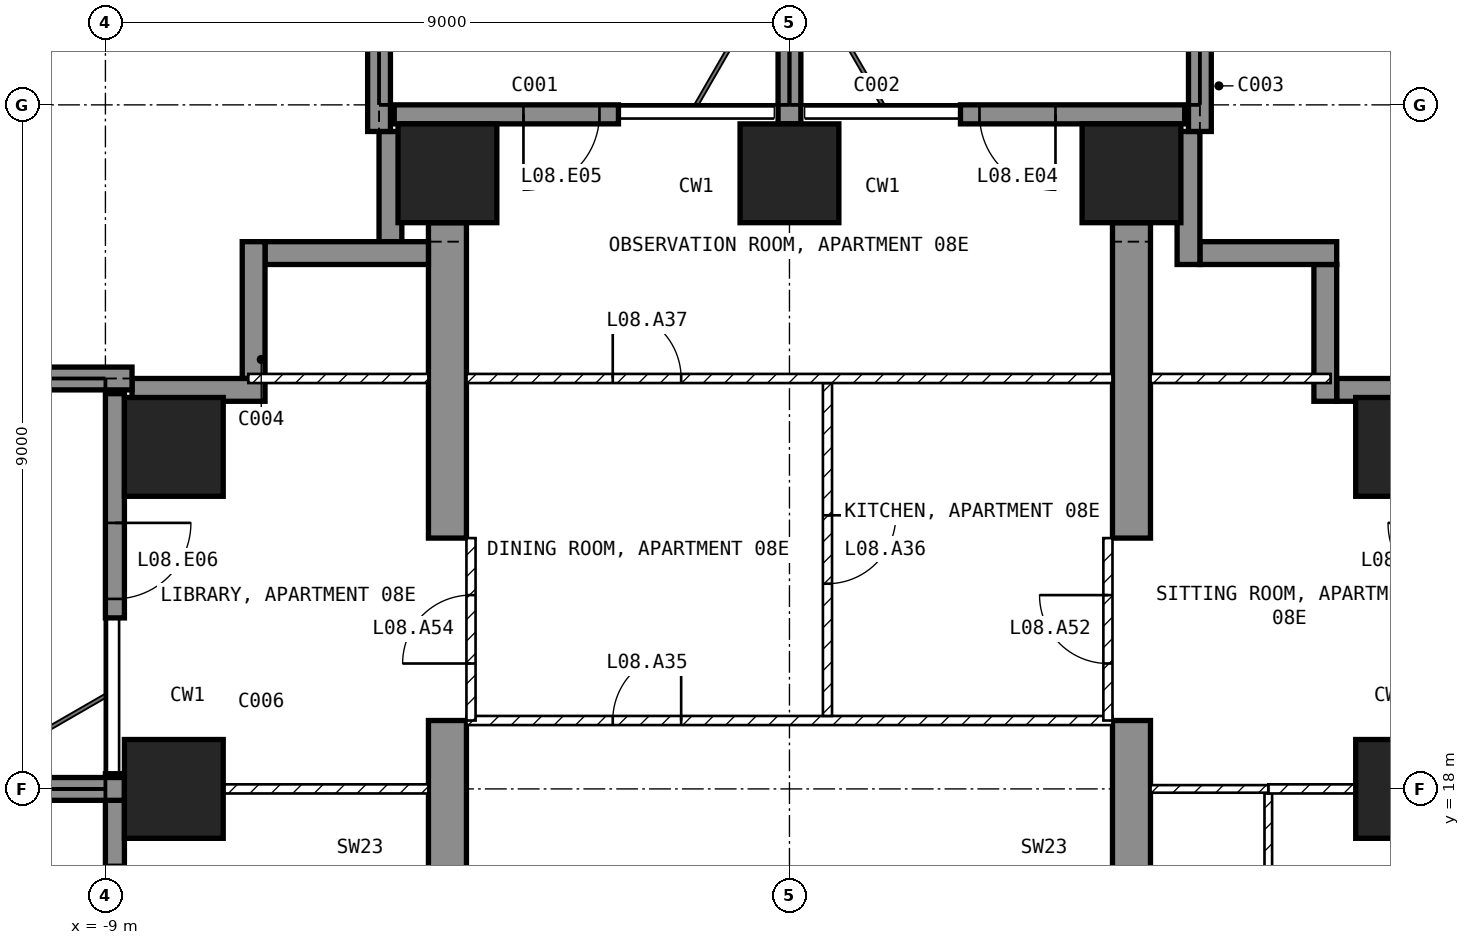
"""IFC4 building model, lengths in metres.
Left out: names, types, materials, properties, quantities, classifications, styles, units other than length and angle.
Written with IfcOpenShell. Run it as: python <this file> out.ifc"""

import sys

from ifc_helpers import new_model, si_unit, direction, frame, frame_2d, origin, origin_2d, place, context, subcontext, project, spatial, polyline, rectangle, outline, extrude, element, fill, save


model = new_model("IFC4")
c1 = context("Model", 3, precision=1e-05, world=origin(), true_north=direction((0.0, 1.0)))
c2 = subcontext(c1, "Body", "Model", "MODEL_VIEW")
j1 = project(units=[si_unit("LENGTHUNIT", "METRE"), si_unit("PLANEANGLEUNIT", "RADIAN")], contexts=[c1])
p1 = place(None, origin())
s1 = spatial("IfcSite", under=j1, at=p1, CompositionType="ELEMENT")
p2 = place(p1, origin())
s2 = spatial("IfcBuilding", under=s1, at=p2, CompositionType="ELEMENT")
p3 = place(p2, frame((0.0, 0.0, 47.0)))
s3 = spatial("IfcBuildingStorey", under=s2, at=p3, CompositionType="ELEMENT", Elevation=47.0)
for number, where, z_axis, x_axis in (
    (1, (-8.1, 18.0, -0.25), (0.0, 0.0, 1.0), (1.0, 0.0, 0.0)),
    (2, (-8.1, 22.5, -0.25), (0.0, 0.0, 1.0), (1.0, 0.0, 0.0)),
    (3, (-4.5, 26.1, -0.25), (0.0, 0.0, 1.0), (1.0, 0.0, 0.0)),
    (4, (0.0, 26.1, -0.25), (0.0, 0.0, 1.0), (1.0, 0.0, 0.0)),
    (5, (4.5, 26.1, -0.25), (0.0, 0.0, 1.0), (1.0, 0.0, 0.0)),
    (6, (8.1, 18.0, -0.25), (0.0, 0.0, 1.0), (1.0, 0.0, 0.0)),
    (7, (8.1, 22.5, -0.25), (0.0, 0.0, 1.0), (1.0, 0.0, 0.0)),
):
    element("IfcColumn", number, at=place(p3, frame(where, z_axis=z_axis, x_axis=x_axis)), inside=s3, PredefinedType="COLUMN", context=c2, shape_type="SweptSolid", body=[
        extrude(rectangle(XDim=1.3, YDim=1.3, at=origin_2d()), origin(), (0.0, 0.0, 1.0), 3.5),
    ])
for number, where, z_axis, x_axis in (
    (8, (-4.75, 9.0, -0.25), (1.0, 0.0, 0.0), (0.0, 1.0, 0.0)),
    (9, (4.25, 9.0, -0.25), (1.0, 0.0, 0.0), (0.0, 1.0, 0.0)),
):
    element("IfcWall", number, at=place(p3, frame(where, z_axis=z_axis, x_axis=x_axis)), inside=s3, PredefinedType="SHEAR", context=c2, shape_type="SweptSolid", body=[
        extrude(outline(polyline([(0.0, 0.0), (2.1, 0.0), (2.1, 2.65), (4.5, 2.65), (4.5, 0.0), (9.9, 0.0), (9.9, 2.65), (12.3, 2.65), (12.3, 0.0), (16.45, 0.0), (16.45, 3.5), (0.0, 3.5), (0.0, 0.0)])), origin(), (0.0, 0.0, 1.0), 0.5),
    ])
p4 = place(p3, frame((5.2, 26.875, 0.0), z_axis=(0.0, 0.0, 1.0), x_axis=(-1.0, 0.0, 0.0)))
e10 = element("IfcWall", 10, at=p4, inside=s3, PredefinedType="SOLIDWALL", context=c2, shape_type="SweptSolid", body=[
    extrude(rectangle(XDim=2.95, YDim=0.25, at=frame_2d((1.475, 0.0))), origin(), (0.0, 0.0, 1.0), 3.25),
])
p5 = place(p4, frame((1.7, 0.0, 0.0)))
e11 = element("IfcOpeningElement", 11, at=p5, cuts=e10, PredefinedType="OPENING", context=c2, shape_type="SweptSolid", body=[
    extrude(rectangle(XDim=1.0, YDim=2.4, at=frame_2d((0.5, 1.2))), frame((0.0, 0.135, 0.0), z_axis=(0.0, -1.0, 0.0), x_axis=(1.0, 0.0, 0.0)), (0.0, 0.0, 1.0), 0.27),
])
p6 = place(p3, frame((-2.25, 26.875, 0.0), z_axis=(0.0, 0.0, 1.0), x_axis=(-1.0, 0.0, 0.0)))
e12 = element("IfcWall", 12, at=p6, inside=s3, PredefinedType="SOLIDWALL", context=c2, shape_type="SweptSolid", body=[
    extrude(rectangle(XDim=2.95, YDim=0.25, at=frame_2d((1.475, 0.0))), origin(), (0.0, 0.0, 1.0), 3.25),
])
p7 = place(p6, frame((0.25, 0.0, 0.0)))
e13 = element("IfcOpeningElement", 13, at=p7, cuts=e12, PredefinedType="OPENING", context=c2, shape_type="SweptSolid", body=[
    extrude(rectangle(XDim=1.0, YDim=2.4, at=frame_2d((0.5, 1.2))), frame((0.0, 0.135, 0.0), z_axis=(0.0, -1.0, 0.0), x_axis=(1.0, 0.0, 0.0)), (0.0, 0.0, 1.0), 0.27),
])
p8 = place(p3, frame((-8.875, 23.2, 0.0), z_axis=(0.0, 0.0, 1.0), x_axis=(0.0, -1.0, 0.0)))
e14 = element("IfcWall", 14, at=p8, inside=s3, PredefinedType="SOLIDWALL", context=c2, shape_type="SweptSolid", body=[
    extrude(rectangle(XDim=2.95, YDim=0.25, at=frame_2d((1.475, 0.0))), origin(), (0.0, 0.0, 1.0), 3.25),
])
p9 = place(p8, frame((1.7, 0.0, 0.0)))
e15 = element("IfcOpeningElement", 15, at=p9, cuts=e14, PredefinedType="OPENING", context=c2, shape_type="SweptSolid", body=[
    extrude(rectangle(XDim=1.0, YDim=2.4, at=frame_2d((0.5, 1.2))), frame((0.0, 0.135, 0.0), z_axis=(0.0, -1.0, 0.0), x_axis=(1.0, 0.0, 0.0)), (0.0, 0.0, 1.0), 0.27),
])
p10 = place(p3, frame((-8.875, 18.2, 0.0), z_axis=(0.0, 0.0, 1.0), x_axis=(0.0, -1.0, 0.0)))
e16 = element("IfcWall", 16, at=p10, inside=s3, PredefinedType="SOLIDWALL", context=c2, shape_type="SweptSolid", body=[
    extrude(rectangle(XDim=2.65, YDim=0.25, at=frame_2d((1.325, 0.0))), origin(), (0.0, 0.0, 1.0), 3.25),
])
p11 = place(p10, frame((1.2, 0.0, 0.0)))
e17 = element("IfcOpeningElement", 17, at=p11, cuts=e16, PredefinedType="OPENING", context=c2, shape_type="SweptSolid", body=[
    extrude(rectangle(XDim=1.2, YDim=2.4, at=frame_2d((0.6, 1.2))), frame((0.0, 0.135, 0.0), z_axis=(0.0, -1.0, 0.0), x_axis=(1.0, 0.0, 0.0)), (0.0, 0.0, 1.0), 0.27),
])
p12 = place(p3, frame((8.65, 23.25, 0.0), z_axis=(0.0, 0.0, 1.0), x_axis=(-1.0, 0.0, 0.0)))
e18 = element("IfcWall", 18, at=p12, inside=s3, PredefinedType="SOLIDWALL", context=c2, shape_type="SweptSolid", body=[
    extrude(rectangle(XDim=1.45, YDim=0.3, at=frame_2d((0.725, 0.0))), origin(), (0.0, 0.0, 1.0), 3.25),
])
p13 = place(p3, frame((7.05, 23.1, 0.0), z_axis=(0.0, 0.0, 1.0), x_axis=(0.0, 1.0, 0.0)))
e19 = element("IfcWall", 19, at=p13, inside=s3, PredefinedType="SOLIDWALL", context=c2, shape_type="SweptSolid", body=[
    extrude(rectangle(XDim=1.8, YDim=0.3, at=frame_2d((0.9, 0.0))), origin(), (0.0, 0.0, 1.0), 3.25),
])
p14 = place(p3, frame((7.2, 25.05, 0.0), z_axis=(0.0, 0.0, 1.0), x_axis=(-1.0, 0.0, 0.0)))
e20 = element("IfcWall", 20, at=p14, inside=s3, PredefinedType="SOLIDWALL", context=c2, shape_type="SweptSolid", body=[
    extrude(rectangle(XDim=1.8, YDim=0.3, at=frame_2d((0.9, 0.0))), origin(), (0.0, 0.0, 1.0), 3.25),
])
p15 = place(p3, frame((5.25, 24.9, 0.0), z_axis=(0.0, 0.0, 1.0), x_axis=(0.0, 1.0, 0.0)))
e21 = element("IfcWall", 21, at=p15, inside=s3, PredefinedType="SOLIDWALL", context=c2, shape_type="SweptSolid", body=[
    extrude(rectangle(XDim=1.75, YDim=0.3, at=frame_2d((0.875, 0.0))), origin(), (0.0, 0.0, 1.0), 3.25),
])
p16 = place(p3, frame((-5.25, 26.65, 0.0), z_axis=(0.0, 0.0, 1.0), x_axis=(0.0, -1.0, 0.0)))
e22 = element("IfcWall", 22, at=p16, inside=s3, PredefinedType="SOLIDWALL", context=c2, shape_type="SweptSolid", body=[
    extrude(rectangle(XDim=1.45, YDim=0.3, at=frame_2d((0.725, 0.0))), origin(), (0.0, 0.0, 1.0), 3.25),
])
p17 = place(p3, frame((-4.75, 25.05, 0.0), z_axis=(0.0, 0.0, 1.0), x_axis=(-1.0, 0.0, 0.0)))
e23 = element("IfcWall", 23, at=p17, inside=s3, PredefinedType="SOLIDWALL", context=c2, shape_type="SweptSolid", body=[
    extrude(rectangle(XDim=2.15, YDim=0.3, at=frame_2d((1.075, 0.0))), origin(), (0.0, 0.0, 1.0), 3.25),
])
p18 = place(p3, frame((-7.05, 25.2, 0.0), z_axis=(0.0, 0.0, 1.0), x_axis=(0.0, -1.0, 0.0)))
e24 = element("IfcWall", 24, at=p18, inside=s3, PredefinedType="SOLIDWALL", context=c2, shape_type="SweptSolid", body=[
    extrude(rectangle(XDim=1.8, YDim=0.3, at=frame_2d((0.9, 0.0))), origin(), (0.0, 0.0, 1.0), 3.25),
])
p19 = place(p3, frame((-6.9, 23.25, 0.0), z_axis=(0.0, 0.0, 1.0), x_axis=(-1.0, 0.0, 0.0)))
e25 = element("IfcWall", 25, at=p19, inside=s3, PredefinedType="SOLIDWALL", context=c2, shape_type="SweptSolid", body=[
    extrude(rectangle(XDim=1.75, YDim=0.3, at=frame_2d((0.875, 0.0))), origin(), (0.0, 0.0, 1.0), 3.25),
])
p20 = place(p3, frame((-8.75, 18.0, 0.0), z_axis=(0.0, 0.0, 1.0), x_axis=(-1.0, 0.0, 0.0)))
e26 = element("IfcWall", 26, at=p20, inside=s3, PredefinedType="SOLIDWALL", context=c2, shape_type="SweptSolid", body=[
    extrude(rectangle(XDim=2.95, YDim=0.3, at=frame_2d((1.475, 0.0))), origin(), (0.0, 0.0, 1.0), 3.25),
])
for number, where, z_axis, x_axis in (
    (27, (-8.65, 23.4, 0.0), (0.0, 0.0, 1.0), (-1.0, 0.0, 0.0)),
    (28, (-5.4, 26.65, 0.0), (0.0, 0.0, 1.0), (0.0, 1.0, 0.0)),
):
    element("IfcWall", number, at=place(p3, frame(where, z_axis=z_axis, x_axis=x_axis)), inside=s3, PredefinedType="SOLIDWALL", context=c2, shape_type="SweptSolid", body=[
        extrude(rectangle(XDim=3.05, YDim=0.3, at=frame_2d((1.525, 0.0))), origin(), (0.0, 0.0, 1.0), 3.25),
    ])
p21 = place(p3, frame((0.0, 26.75, 0.0), z_axis=(0.0, 0.0, 1.0), x_axis=(0.0, 1.0, 0.0)))
e29 = element("IfcWall", 29, at=p21, inside=s3, PredefinedType="SOLIDWALL", context=c2, shape_type="SweptSolid", body=[
    extrude(rectangle(XDim=2.95, YDim=0.3, at=frame_2d((1.475, 0.0))), origin(), (0.0, 0.0, 1.0), 3.25),
])
p22 = place(p3, frame((5.4, 26.65, 0.0), z_axis=(0.0, 0.0, 1.0), x_axis=(0.0, 1.0, 0.0)))
e30 = element("IfcWall", 30, at=p22, inside=s3, PredefinedType="SOLIDWALL", context=c2, shape_type="SweptSolid", body=[
    extrude(rectangle(XDim=3.05, YDim=0.3, at=frame_2d((1.525, 0.0))), origin(), (0.0, 0.0, 1.0), 3.25),
])
p23 = place(p3, frame((-4.25, 18.9, 0.0), z_axis=(0.0, 0.0, 1.0), x_axis=(1.0, 0.0, 0.0)))
e31 = element("IfcWall", 31, at=p23, inside=s3, PredefinedType="PARTITIONING", context=c2, shape_type="SweptSolid", body=[
    extrude(rectangle(XDim=8.5, YDim=0.12, at=frame_2d((4.25, 0.0))), origin(), (0.0, 0.0, 1.0), 3.25),
])
p24 = place(p23, frame((1.925, 0.0, 0.0)))
e32 = element("IfcOpeningElement", 32, at=p24, cuts=e31, PredefinedType="OPENING", context=c2, shape_type="SweptSolid", body=[
    extrude(rectangle(XDim=0.9, YDim=2.1, at=frame_2d((0.45, 1.05))), frame((0.0, 0.07, 0.0), z_axis=(0.0, -1.0, 0.0), x_axis=(1.0, 0.0, 0.0)), (0.0, 0.0, 1.0), 0.14),
])
p25 = place(p3, frame((0.5, 23.34, 0.0), z_axis=(0.0, 0.0, 1.0), x_axis=(0.0, -1.0, 0.0)))
e33 = element("IfcWall", 33, at=p25, inside=s3, PredefinedType="PARTITIONING", context=c2, shape_type="SweptSolid", body=[
    extrude(rectangle(XDim=4.38, YDim=0.12, at=frame_2d((2.19, 0.0))), origin(), (0.0, 0.0, 1.0), 3.25),
])
p26 = place(p25, frame((1.74, 0.0, 0.0)))
e34 = element("IfcOpeningElement", 34, at=p26, cuts=e33, PredefinedType="OPENING", context=c2, shape_type="SweptSolid", body=[
    extrude(rectangle(XDim=0.9, YDim=2.1, at=frame_2d((0.45, 1.05))), frame((0.0, 0.07, 0.0), z_axis=(0.0, -1.0, 0.0), x_axis=(1.0, 0.0, 0.0)), (0.0, 0.0, 1.0), 0.14),
])
p27 = place(p3, frame((-4.25, 23.4, 0.0), z_axis=(0.0, 0.0, 1.0), x_axis=(1.0, 0.0, 0.0)))
e35 = element("IfcWall", 35, at=p27, inside=s3, PredefinedType="PARTITIONING", context=c2, shape_type="SweptSolid", body=[
    extrude(rectangle(XDim=8.5, YDim=0.12, at=frame_2d((4.25, 0.0))), origin(), (0.0, 0.0, 1.0), 3.25),
])
p28 = place(p27, frame((1.925, 0.0, 0.0)))
e36 = element("IfcOpeningElement", 36, at=p28, cuts=e35, PredefinedType="OPENING", context=c2, shape_type="SweptSolid", body=[
    extrude(rectangle(XDim=0.9, YDim=2.1, at=frame_2d((0.45, 1.05))), frame((0.0, 0.07, 0.0), z_axis=(0.0, -1.0, 0.0), x_axis=(1.0, 0.0, 0.0)), (0.0, 0.0, 1.0), 0.14),
])
p29 = place(p3, frame((6.3, 14.45, 0.0), z_axis=(0.0, 0.0, 1.0), x_axis=(0.0, 1.0, 0.0)))
e37 = element("IfcWall", 37, at=p29, inside=s3, PredefinedType="PARTITIONING", context=c2, shape_type="SweptSolid", body=[
    extrude(rectangle(XDim=3.49, YDim=0.1, at=frame_2d((1.745, 0.0))), origin(), (0.0, 0.0, 1.0), 3.25),
])
p30 = place(p3, frame((6.3, 18.0, 0.0), z_axis=(0.0, 0.0, 1.0), x_axis=(1.0, 0.0, 0.0)))
e38 = element("IfcWall", 38, at=p30, inside=s3, PredefinedType="PARTITIONING", context=c2, shape_type="SweptSolid", body=[
    extrude(rectangle(XDim=1.15, YDim=0.12, at=frame_2d((0.575, 0.0))), origin(), (0.0, 0.0, 1.0), 2.346),
])
p31 = place(p3, frame((4.75, 18.0, 0.0), z_axis=(0.0, 0.0, 1.0), x_axis=(1.0, 0.0, 0.0)))
e39 = element("IfcWall", 39, at=p31, inside=s3, PredefinedType="PARTITIONING", context=c2, shape_type="SweptSolid", body=[
    extrude(rectangle(XDim=1.55, YDim=0.1, at=frame_2d((0.775, 0.0))), origin(), (0.0, 0.0, 1.0), 2.346),
])
p32 = place(p3, frame((4.75, 23.4, 0.0), z_axis=(0.0, 0.0, 1.0), x_axis=(1.0, 0.0, 0.0)))
e40 = element("IfcWall", 40, at=p32, inside=s3, PredefinedType="PARTITIONING", context=c2, shape_type="SweptSolid", body=[
    extrude(rectangle(XDim=2.37, YDim=0.12, at=frame_2d((1.185, 0.0))), origin(), (0.0, 0.0, 1.0), 3.25),
])
p33 = place(p3, frame((-7.45, 18.0, 0.0), z_axis=(0.0, 0.0, 1.0), x_axis=(1.0, 0.0, 0.0)))
e41 = element("IfcWall", 41, at=p33, inside=s3, PredefinedType="PARTITIONING", context=c2, shape_type="SweptSolid", body=[
    extrude(rectangle(XDim=2.7, YDim=0.12, at=frame_2d((1.35, 0.0))), origin(), (0.0, 0.0, 1.0), 2.346),
])
p34 = place(p3, frame((-7.12, 23.4, 0.0), z_axis=(0.0, 0.0, 1.0), x_axis=(1.0, 0.0, 0.0)))
e42 = element("IfcWall", 42, at=p34, inside=s3, PredefinedType="PARTITIONING", context=c2, shape_type="SweptSolid", body=[
    extrude(rectangle(XDim=2.37, YDim=0.12, at=frame_2d((1.185, 0.0))), origin(), (0.0, 0.0, 1.0), 3.25),
])
p35 = place(p3, frame((4.19, 18.9, 0.0), z_axis=(0.0, 0.0, 1.0), x_axis=(0.0, 1.0, 0.0)))
e43 = element("IfcWall", 43, at=p35, inside=s3, PredefinedType="PARTITIONING", context=c2, shape_type="SweptSolid", body=[
    extrude(rectangle(XDim=2.4, YDim=0.12, at=frame_2d((1.2, 0.0))), origin(), (0.0, 0.0, 1.0), 2.4),
])
p36 = place(p35, frame((0.75, 0.0, 0.0)))
e44 = element("IfcOpeningElement", 44, at=p36, cuts=e43, PredefinedType="OPENING", context=c2, shape_type="SweptSolid", body=[
    extrude(rectangle(XDim=0.9, YDim=2.1, at=frame_2d((0.45, 1.05))), frame((0.0, 0.07, 0.0), z_axis=(0.0, -1.0, 0.0), x_axis=(1.0, 0.0, 0.0)), (0.0, 0.0, 1.0), 0.14),
])
p37 = place(p3, frame((-4.19, 18.9, 0.0), z_axis=(0.0, 0.0, 1.0), x_axis=(0.0, 1.0, 0.0)))
e45 = element("IfcWall", 45, at=p37, inside=s3, PredefinedType="PARTITIONING", context=c2, shape_type="SweptSolid", body=[
    extrude(rectangle(XDim=2.4, YDim=0.12, at=frame_2d((1.2, 0.0))), origin(), (0.0, 0.0, 1.0), 2.4),
])
p38 = place(p37, frame((0.75, 0.0, 0.0)))
e46 = element("IfcOpeningElement", 46, at=p38, cuts=e45, PredefinedType="OPENING", context=c2, shape_type="SweptSolid", body=[
    extrude(rectangle(XDim=0.9, YDim=2.1, at=frame_2d((0.45, 1.05))), frame((0.0, 0.07, 0.0), z_axis=(0.0, -1.0, 0.0), x_axis=(1.0, 0.0, 0.0)), (0.0, 0.0, 1.0), 0.14),
])
p39 = place(p5, origin())
e47 = element("IfcDoor", 47, at=p39, inside=s3, OperationType="SINGLE_SWING_LEFT", PredefinedType="DOOR", context=c2, shape_type="SweptSolid", body=[
    extrude(rectangle(XDim=1.0, YDim=2.4, at=frame_2d((0.5, 1.2))), frame((0.0, 0.025, 0.0), z_axis=(0.0, -1.0, 0.0), x_axis=(1.0, 0.0, 0.0)), (0.0, 0.0, 1.0), 0.05),
])
fill(e11, e47)
p40 = place(p7, origin())
e48 = element("IfcDoor", 48, at=p40, inside=s3, OperationType="SINGLE_SWING_RIGHT", PredefinedType="DOOR", context=c2, shape_type="SweptSolid", body=[
    extrude(rectangle(XDim=1.0, YDim=2.4, at=frame_2d((0.5, 1.2))), frame((0.0, 0.025, 0.0), z_axis=(0.0, -1.0, 0.0), x_axis=(1.0, 0.0, 0.0)), (0.0, 0.0, 1.0), 0.05),
])
fill(e13, e48)
p41 = place(p9, origin())
e49 = element("IfcDoor", 49, at=p41, inside=s3, OperationType="SINGLE_SWING_LEFT", PredefinedType="DOOR", context=c2, shape_type="SweptSolid", body=[
    extrude(rectangle(XDim=1.0, YDim=2.4, at=frame_2d((0.5, 1.2))), frame((0.0, 0.025, 0.0), z_axis=(0.0, -1.0, 0.0), x_axis=(1.0, 0.0, 0.0)), (0.0, 0.0, 1.0), 0.05),
])
fill(e15, e49)
p42 = place(p24, origin())
e50 = element("IfcDoor", 50, at=p42, inside=s3, OperationType="SINGLE_SWING_RIGHT", PredefinedType="DOOR", context=c2, shape_type="SweptSolid", body=[
    extrude(rectangle(XDim=0.9, YDim=2.1, at=frame_2d((0.45, 1.05))), frame((0.0, 0.025, 0.0), z_axis=(0.0, -1.0, 0.0), x_axis=(1.0, 0.0, 0.0)), (0.0, 0.0, 1.0), 0.05),
])
fill(e32, e50)
p43 = place(p26, origin())
e51 = element("IfcDoor", 51, at=p43, inside=s3, OperationType="SINGLE_SWING_LEFT", PredefinedType="DOOR", context=c2, shape_type="SweptSolid", body=[
    extrude(rectangle(XDim=0.9, YDim=2.1, at=frame_2d((0.45, 1.05))), frame((0.0, 0.025, 0.0), z_axis=(0.0, -1.0, 0.0), x_axis=(1.0, 0.0, 0.0)), (0.0, 0.0, 1.0), 0.05),
])
fill(e34, e51)
p44 = place(p28, origin())
e52 = element("IfcDoor", 52, at=p44, inside=s3, OperationType="SINGLE_SWING_LEFT", PredefinedType="DOOR", context=c2, shape_type="SweptSolid", body=[
    extrude(rectangle(XDim=0.9, YDim=2.1, at=frame_2d((0.45, 1.05))), frame((0.0, 0.025, 0.0), z_axis=(0.0, -1.0, 0.0), x_axis=(1.0, 0.0, 0.0)), (0.0, 0.0, 1.0), 0.05),
])
fill(e36, e52)
p45 = place(p36, origin())
e53 = element("IfcDoor", 53, at=p45, inside=s3, OperationType="SINGLE_SWING_RIGHT", PredefinedType="DOOR", context=c2, shape_type="SweptSolid", body=[
    extrude(rectangle(XDim=0.9, YDim=2.1, at=frame_2d((0.45, 1.05))), frame((0.0, 0.025, 0.0), z_axis=(0.0, -1.0, 0.0), x_axis=(1.0, 0.0, 0.0)), (0.0, 0.0, 1.0), 0.05),
])
fill(e44, e53)
p46 = place(p38, origin())
e54 = element("IfcDoor", 54, at=p46, inside=s3, OperationType="SINGLE_SWING_LEFT", PredefinedType="DOOR", context=c2, shape_type="SweptSolid", body=[
    extrude(rectangle(XDim=0.9, YDim=2.1, at=frame_2d((0.45, 1.05))), frame((0.0, 0.025, 0.0), z_axis=(0.0, -1.0, 0.0), x_axis=(1.0, 0.0, 0.0)), (0.0, 0.0, 1.0), 0.05),
])
fill(e46, e54)
save(model, sys.argv[1])
